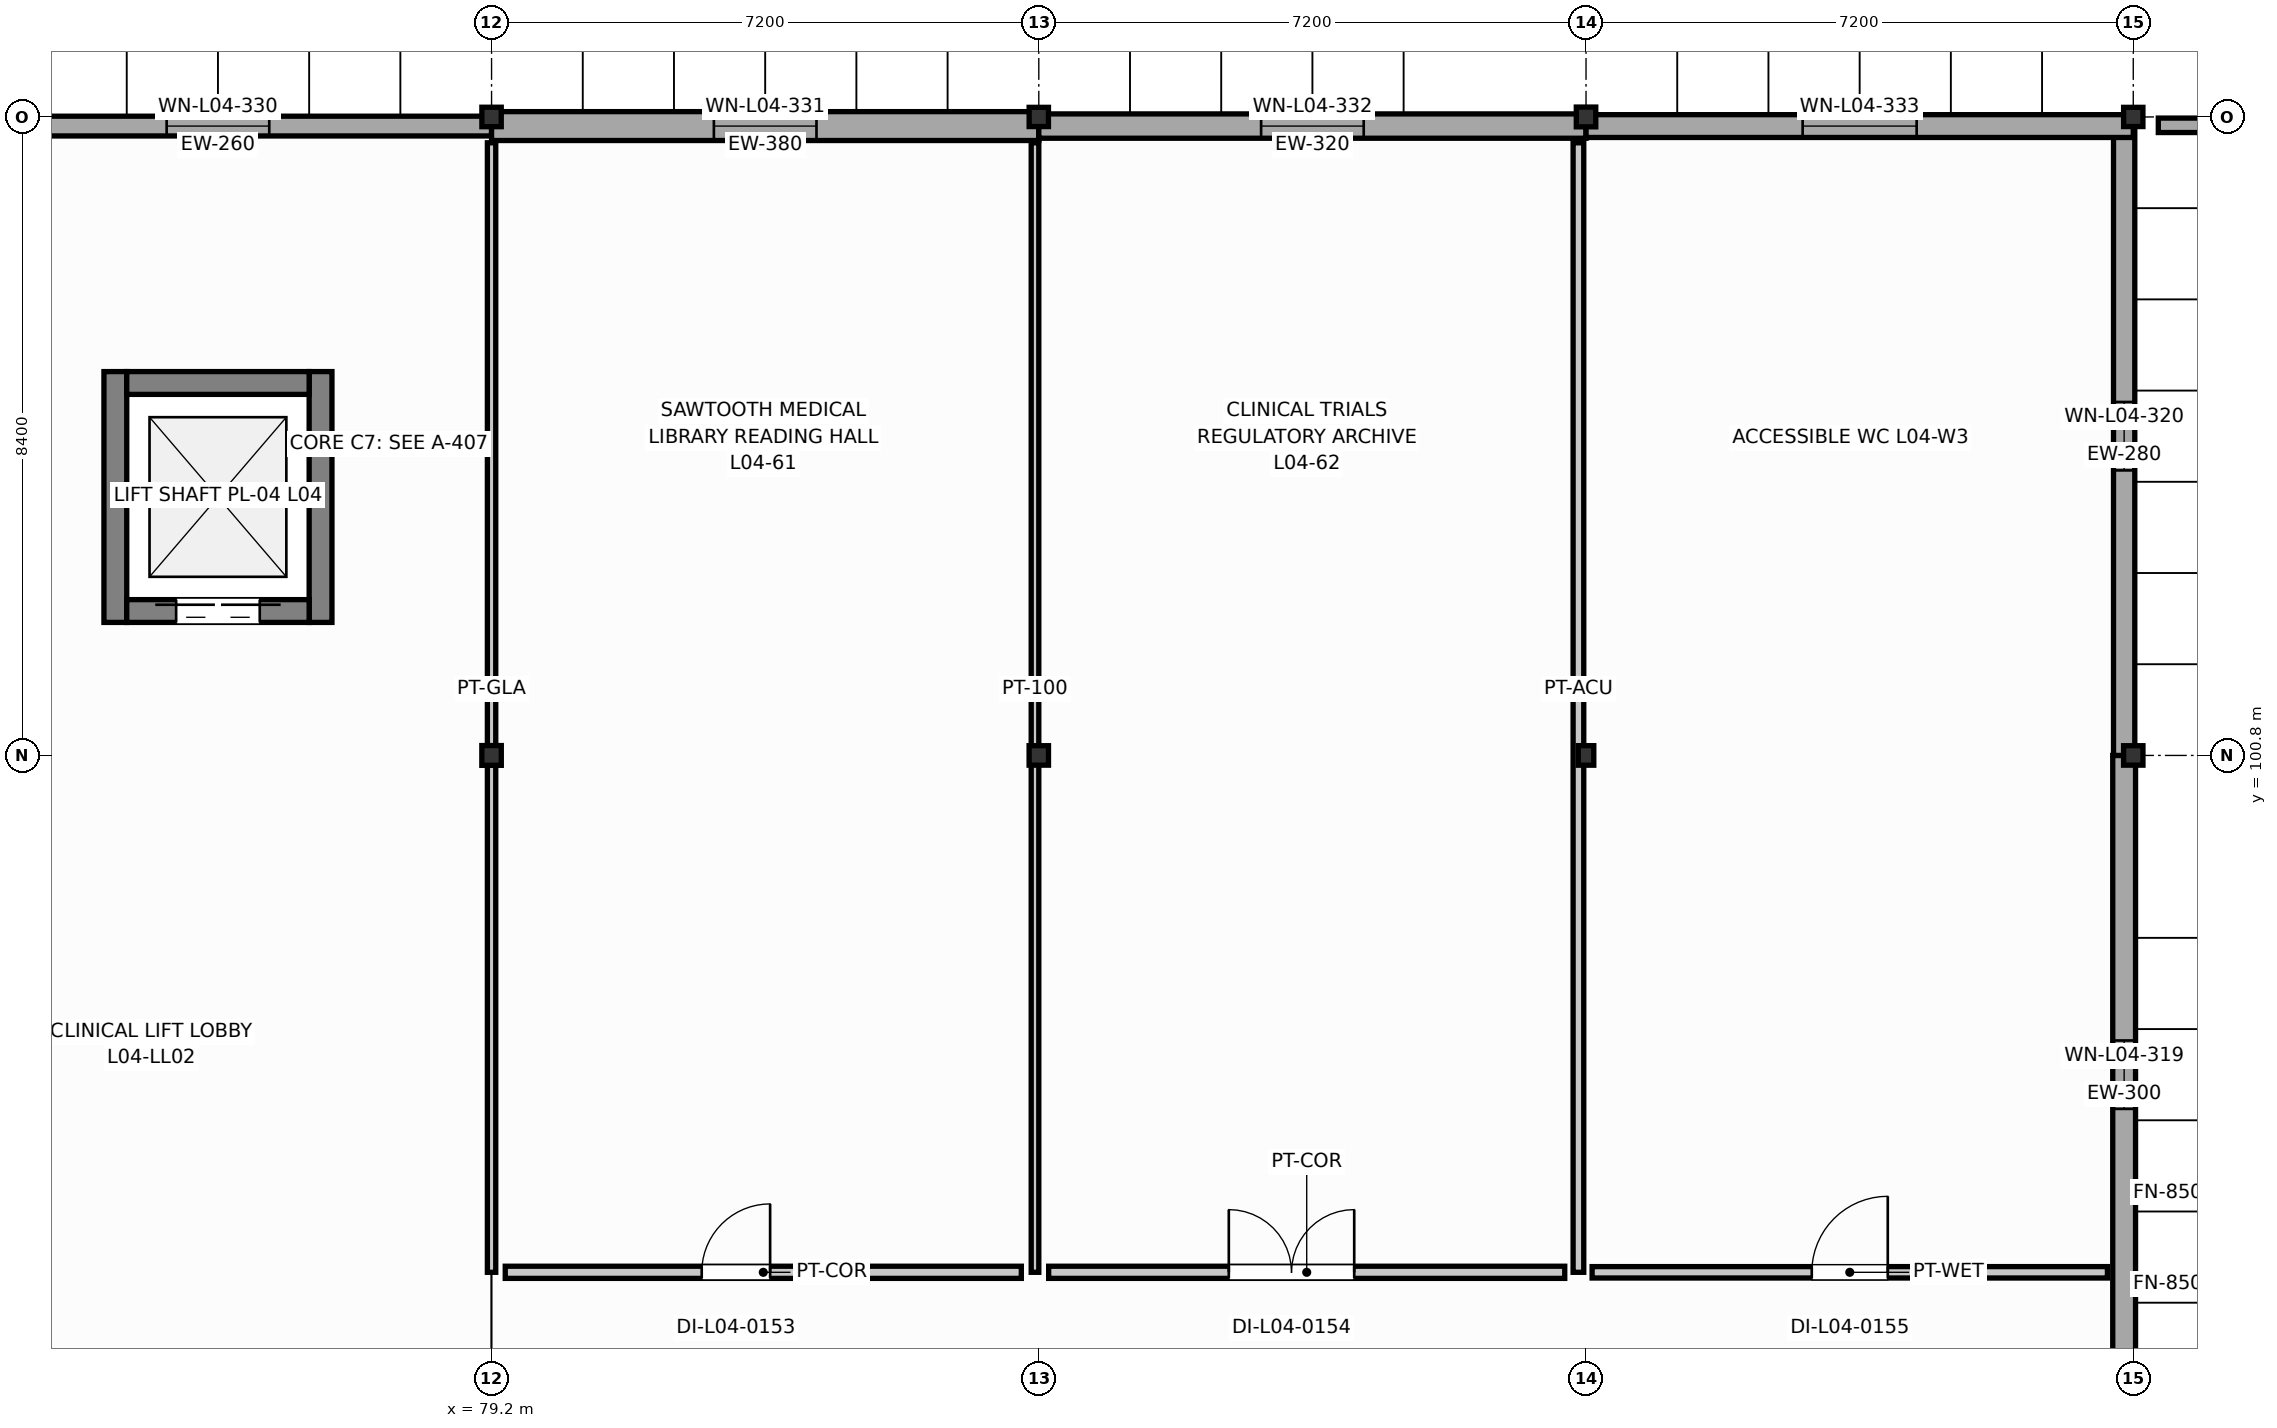
"""IFC4 building model, lengths in metres.
Left out: names, types, materials, properties, quantities, classifications, styles, units other than length and angle.
Written with IfcOpenShell. Run it as: python <this file> out.ifc"""

import sys

from ifc_helpers import new_model, si_unit, direction, frame, frame_2d, origin, origin_2d, place, context, subcontext, project, spatial, rectangle, i_section, extrude, element, fill, save


model = new_model("IFC4")
c1 = context("Model", 3, precision=1e-05, world=origin(), true_north=direction((0.0, 1.0)))
c2 = subcontext(c1, "Body", "Model", "MODEL_VIEW")
j1 = project(units=[si_unit("LENGTHUNIT", "METRE"), si_unit("PLANEANGLEUNIT", "RADIAN")], contexts=[c1])
p1 = place(None, origin())
s1 = spatial("IfcSite", under=j1, at=p1, CompositionType="ELEMENT")
p2 = place(p1, origin())
s2 = spatial("IfcBuilding", under=s1, at=p2, CompositionType="ELEMENT")
p3 = place(p2, frame((0.0, 0.0, 17.4)))
s3 = spatial("IfcBuildingStorey", under=s2, at=p3, CompositionType="ELEMENT", Elevation=17.4)
p4 = place(p3, frame((79.2, 100.8, 0.0), z_axis=(0.0, 0.0, 1.0), x_axis=(1.0, 0.0, 0.0)))
e1 = element("IfcColumn", 1, at=p4, inside=s3, PredefinedType="COLUMN", context=c2, shape_type="SweptSolid", body=[
    extrude(i_section(OverallWidth=0.256, OverallDepth=0.26, WebThickness=0.011, FlangeThickness=0.017, FilletRadius=0.013, at=origin_2d()), origin(), (0.0, 0.0, 1.0), 4.2),
])
for number, where, z_axis, x_axis in (
    (2, (79.2, 109.2, 0.0), (0.0, 0.0, 1.0), (1.0, 0.0, 0.0)),
    (3, (86.4, 100.8, 0.0), (0.0, 0.0, 1.0), (1.0, 0.0, 0.0)),
):
    element("IfcColumn", number, at=place(p3, frame(where, z_axis=z_axis, x_axis=x_axis)), inside=s3, PredefinedType="COLUMN", context=c2, shape_type="SweptSolid", body=[
        extrude(i_section(OverallWidth=0.255, OverallDepth=0.256, WebThickness=0.01, FlangeThickness=0.016, FilletRadius=0.013, at=origin_2d()), origin(), (0.0, 0.0, 1.0), 4.2),
    ])
p5 = place(p3, frame((86.4, 109.2, 0.0), z_axis=(0.0, 0.0, 1.0), x_axis=(1.0, 0.0, 0.0)))
e4 = element("IfcColumn", 4, at=p5, inside=s3, PredefinedType="COLUMN", context=c2, shape_type="SweptSolid", body=[
    extrude(i_section(OverallWidth=0.254, OverallDepth=0.253, WebThickness=0.009, FlangeThickness=0.014, FilletRadius=0.013, at=origin_2d()), origin(), (0.0, 0.0, 1.0), 4.2),
])
p6 = place(p3, frame((93.6, 100.8, 0.0), z_axis=(0.0, 0.0, 1.0), x_axis=(1.0, 0.0, 0.0)))
e5 = element("IfcColumn", 5, at=p6, inside=s3, PredefinedType="COLUMN", context=c2, shape_type="SweptSolid", body=[
    extrude(i_section(OverallWidth=0.204, OverallDepth=0.257, WebThickness=0.009, FlangeThickness=0.016, FilletRadius=0.013, at=origin_2d()), origin(), (0.0, 0.0, 1.0), 4.2),
])
p7 = place(p3, frame((93.6, 109.2, 0.0), z_axis=(0.0, 0.0, 1.0), x_axis=(1.0, 0.0, 0.0)))
e6 = element("IfcColumn", 6, at=p7, inside=s3, PredefinedType="COLUMN", context=c2, shape_type="SweptSolid", body=[
    extrude(i_section(OverallWidth=0.256, OverallDepth=0.26, WebThickness=0.011, FlangeThickness=0.017, FilletRadius=0.013, at=origin_2d()), origin(), (0.0, 0.0, 1.0), 4.2),
])
p8 = place(p3, frame((100.8, 100.8, 0.0), z_axis=(0.0, 0.0, 1.0), x_axis=(1.0, 0.0, 0.0)))
e7 = element("IfcColumn", 7, at=p8, inside=s3, PredefinedType="COLUMN", context=c2, shape_type="SweptSolid", body=[
    extrude(i_section(OverallWidth=0.255, OverallDepth=0.256, WebThickness=0.01, FlangeThickness=0.016, FilletRadius=0.013, at=origin_2d()), origin(), (0.0, 0.0, 1.0), 4.2),
])
p9 = place(p3, frame((100.8, 109.2, 0.0), z_axis=(0.0, 0.0, 1.0), x_axis=(1.0, 0.0, 0.0)))
e8 = element("IfcColumn", 8, at=p9, inside=s3, PredefinedType="COLUMN", context=c2, shape_type="SweptSolid", body=[
    extrude(i_section(OverallWidth=0.254, OverallDepth=0.253, WebThickness=0.009, FlangeThickness=0.014, FilletRadius=0.013, at=origin_2d()), origin(), (0.0, 0.0, 1.0), 4.2),
])
for number, where, z_axis, x_axis in (
    (9, (74.25, 102.55, 0.0), (0.0, 0.0, 1.0), (0.0, 1.0, 0.0)),
    (10, (76.95, 102.55, 0.0), (0.0, 0.0, 1.0), (0.0, 1.0, 0.0)),
):
    element("IfcWall", number, at=place(p3, frame(where, z_axis=z_axis, x_axis=x_axis)), inside=s3, PredefinedType="SHEAR", context=c2, shape_type="SweptSolid", body=[
        extrude(rectangle(XDim=3.3, YDim=0.3, at=frame_2d((1.65, 0.0))), origin(), (0.0, 0.0, 1.0), 4.0),
    ])
p10 = place(p3, frame((74.4, 105.7, 0.0), z_axis=(0.0, 0.0, 1.0), x_axis=(1.0, 0.0, 0.0)))
e11 = element("IfcWall", 11, at=p10, inside=s3, PredefinedType="SHEAR", context=c2, shape_type="SweptSolid", body=[
    extrude(rectangle(XDim=2.4, YDim=0.3, at=frame_2d((1.2, 0.0))), origin(), (0.0, 0.0, 1.0), 4.0),
])
p11 = place(p3, frame((74.4, 102.7, 0.0), z_axis=(0.0, 0.0, 1.0), x_axis=(1.0, 0.0, 0.0)))
e12 = element("IfcWall", 12, at=p11, inside=s3, PredefinedType="SHEAR", context=c2, shape_type="SweptSolid", body=[
    extrude(rectangle(XDim=2.4, YDim=0.3, at=frame_2d((1.2, 0.0))), origin(), (0.0, 0.0, 1.0), 4.0),
])
p12 = place(p11, frame((0.65, 0.0, 0.0)))
e13 = element("IfcOpeningElement", 13, at=p12, cuts=e12, PredefinedType="OPENING", context=c2, shape_type="SweptSolid", body=[
    extrude(rectangle(XDim=1.1, YDim=2.15, at=frame_2d((0.55, 1.075))), frame((0.0, 0.16, 0.0), z_axis=(0.0, -1.0, 0.0), x_axis=(1.0, 0.0, 0.0)), (0.0, 0.0, 1.0), 0.32),
])
p13 = place(p3, frame((100.68, 92.4, 0.0), z_axis=(0.0, 0.0, 1.0), x_axis=(0.0, 1.0, 0.0)))
e14 = element("IfcWall", 14, at=p13, inside=s3, PredefinedType="SOLIDWALL", context=c2, shape_type="SweptSolid", body=[
    extrude(rectangle(XDim=8.4, YDim=0.3, at=frame_2d((4.2, 0.0))), origin(), (0.0, 0.0, 1.0), 3.405),
])
p14 = place(p13, frame((3.75, 0.0, 0.95)))
e15 = element("IfcOpeningElement", 15, at=p14, cuts=e14, PredefinedType="OPENING", context=c2, shape_type="SweptSolid", body=[
    extrude(rectangle(XDim=0.9, YDim=1.55, at=frame_2d((0.45, 0.775))), frame((0.0, 0.16, 0.0), z_axis=(0.0, -1.0, 0.0), x_axis=(1.0, 0.0, 0.0)), (0.0, 0.0, 1.0), 0.32),
])
p15 = place(p3, frame((100.68, 100.8, 0.0), z_axis=(0.0, 0.0, 1.0), x_axis=(0.0, 1.0, 0.0)))
e16 = element("IfcWall", 16, at=p15, inside=s3, PredefinedType="SOLIDWALL", context=c2, shape_type="SweptSolid", body=[
    extrude(rectangle(XDim=8.4, YDim=0.28, at=frame_2d((4.2, 0.0))), origin(), (0.0, 0.0, 1.0), 3.405),
])
p16 = place(p15, frame((3.75, 0.0, 0.95)))
e17 = element("IfcOpeningElement", 17, at=p16, cuts=e16, PredefinedType="OPENING", context=c2, shape_type="SweptSolid", body=[
    extrude(rectangle(XDim=0.9, YDim=1.75, at=frame_2d((0.45, 0.875))), frame((0.0, 0.15, 0.0), z_axis=(0.0, -1.0, 0.0), x_axis=(1.0, 0.0, 0.0)), (0.0, 0.0, 1.0), 0.3),
])
p17 = place(p3, frame((72.0, 109.08, 0.0), z_axis=(0.0, 0.0, 1.0), x_axis=(1.0, 0.0, 0.0)))
e18 = element("IfcWall", 18, at=p17, inside=s3, PredefinedType="SOLIDWALL", context=c2, shape_type="SweptSolid", body=[
    extrude(rectangle(XDim=7.2, YDim=0.26, at=frame_2d((3.6, 0.0))), origin(), (0.0, 0.0, 1.0), 3.482),
])
p18 = place(p17, frame((2.925, 0.0, 0.95)))
e19 = element("IfcOpeningElement", 19, at=p18, cuts=e18, PredefinedType="OPENING", context=c2, shape_type="SweptSolid", body=[
    extrude(rectangle(XDim=1.35, YDim=1.35, at=frame_2d((0.675, 0.675))), frame((0.0, 0.14, 0.0), z_axis=(0.0, -1.0, 0.0), x_axis=(1.0, 0.0, 0.0)), (0.0, 0.0, 1.0), 0.28),
])
p19 = place(p3, frame((79.2, 109.08, 0.0), z_axis=(0.0, 0.0, 1.0), x_axis=(1.0, 0.0, 0.0)))
e20 = element("IfcWall", 20, at=p19, inside=s3, PredefinedType="SOLIDWALL", context=c2, shape_type="SweptSolid", body=[
    extrude(rectangle(XDim=7.2, YDim=0.38, at=frame_2d((3.6, 0.0))), origin(), (0.0, 0.0, 1.0), 3.482),
])
p20 = place(p19, frame((2.925, 0.0, 0.95)))
e21 = element("IfcOpeningElement", 21, at=p20, cuts=e20, PredefinedType="OPENING", context=c2, shape_type="SweptSolid", body=[
    extrude(rectangle(XDim=1.35, YDim=1.55, at=frame_2d((0.675, 0.775))), frame((0.0, 0.2, 0.0), z_axis=(0.0, -1.0, 0.0), x_axis=(1.0, 0.0, 0.0)), (0.0, 0.0, 1.0), 0.4),
])
p21 = place(p3, frame((86.4, 109.08, 0.0), z_axis=(0.0, 0.0, 1.0), x_axis=(1.0, 0.0, 0.0)))
e22 = element("IfcWall", 22, at=p21, inside=s3, PredefinedType="SOLIDWALL", context=c2, shape_type="SweptSolid", body=[
    extrude(rectangle(XDim=7.2, YDim=0.32, at=frame_2d((3.6, 0.0))), origin(), (0.0, 0.0, 1.0), 3.482),
])
p22 = place(p21, frame((2.925, 0.0, 0.95)))
e23 = element("IfcOpeningElement", 23, at=p22, cuts=e22, PredefinedType="OPENING", context=c2, shape_type="SweptSolid", body=[
    extrude(rectangle(XDim=1.35, YDim=1.75, at=frame_2d((0.675, 0.875))), frame((0.0, 0.17, 0.0), z_axis=(0.0, -1.0, 0.0), x_axis=(1.0, 0.0, 0.0)), (0.0, 0.0, 1.0), 0.34),
])
p23 = place(p3, frame((93.6, 109.08, 0.0), z_axis=(0.0, 0.0, 1.0), x_axis=(1.0, 0.0, 0.0)))
e24 = element("IfcWall", 24, at=p23, inside=s3, PredefinedType="SOLIDWALL", context=c2, shape_type="SweptSolid", body=[
    extrude(rectangle(XDim=7.2, YDim=0.3, at=frame_2d((3.6, 0.0))), origin(), (0.0, 0.0, 1.0), 3.482),
])
p24 = place(p23, frame((2.85, 0.0, 0.95)))
e25 = element("IfcOpeningElement", 25, at=p24, cuts=e24, PredefinedType="OPENING", context=c2, shape_type="SweptSolid", body=[
    extrude(rectangle(XDim=1.5, YDim=1.15, at=frame_2d((0.75, 0.575))), frame((0.0, 0.16, 0.0), z_axis=(0.0, -1.0, 0.0), x_axis=(1.0, 0.0, 0.0)), (0.0, 0.0, 1.0), 0.32),
])
p25 = place(p3, frame((101.129, 109.09, 0.0), z_axis=(0.0, 0.0, 1.0), x_axis=(1.0, 0.0, 0.0)))
e26 = element("IfcWall", 26, at=p25, inside=s3, PredefinedType="PARAPET", context=c2, shape_type="SweptSolid", body=[
    extrude(rectangle(XDim=6.594, YDim=0.19, at=frame_2d((3.297, 0.0))), origin(), (0.0, 0.0, 1.0), 1.15),
])
p26 = place(p3, frame((79.2, 94.0, 0.0), z_axis=(0.0, 0.0, 1.0), x_axis=(0.0, 1.0, 0.0)))
e27 = element("IfcWall", 27, at=p26, inside=s3, PredefinedType="MOVABLE", context=c2, shape_type="SweptSolid", body=[
    extrude(rectangle(XDim=14.86, YDim=0.11, at=frame_2d((7.43, 0.0))), origin(), (0.0, 0.0, 1.0), 3.408),
])
p27 = place(p3, frame((86.35, 108.86, 0.0), z_axis=(0.0, 0.0, 1.0), x_axis=(0.0, -1.0, 0.0)))
e28 = element("IfcWall", 28, at=p27, inside=s3, PredefinedType="PARTITIONING", context=c2, shape_type="SweptSolid", body=[
    extrude(rectangle(XDim=14.86, YDim=0.1, at=frame_2d((7.43, 0.0))), origin(), (0.0, 0.0, 1.0), 3.485),
])
p28 = place(p3, frame((86.17, 94.0, 0.0), z_axis=(0.0, 0.0, 1.0), x_axis=(-1.0, 0.0, 0.0)))
e29 = element("IfcWall", 29, at=p28, inside=s3, PredefinedType="PARTITIONING", context=c2, shape_type="SweptSolid", body=[
    extrude(rectangle(XDim=6.79, YDim=0.16, at=frame_2d((3.395, 0.0))), origin(), (0.0, 0.0, 1.0), 3.408),
])
p29 = place(p28, frame((3.305, 0.0, 0.0)))
e30 = element("IfcOpeningElement", 30, at=p29, cuts=e29, PredefinedType="OPENING", context=c2, shape_type="SweptSolid", body=[
    extrude(rectangle(XDim=0.9, YDim=2.04, at=frame_2d((0.45, 1.02))), frame((0.0, 0.09, 0.0), z_axis=(0.0, -1.0, 0.0), x_axis=(1.0, 0.0, 0.0)), (0.0, 0.0, 1.0), 0.18),
])
p30 = place(p3, frame((93.5, 108.86, 0.0), z_axis=(0.0, 0.0, 1.0), x_axis=(0.0, -1.0, 0.0)))
e31 = element("IfcWall", 31, at=p30, inside=s3, PredefinedType="PARTITIONING", context=c2, shape_type="SweptSolid", body=[
    extrude(rectangle(XDim=14.86, YDim=0.14, at=frame_2d((7.43, 0.0))), origin(), (0.0, 0.0, 1.0), 3.175),
])
p31 = place(p3, frame((93.32, 94.0, 0.0), z_axis=(0.0, 0.0, 1.0), x_axis=(-1.0, 0.0, 0.0)))
e32 = element("IfcWall", 32, at=p31, inside=s3, PredefinedType="PARTITIONING", context=c2, shape_type="SweptSolid", body=[
    extrude(rectangle(XDim=6.79, YDim=0.16, at=frame_2d((3.395, 0.0))), origin(), (0.0, 0.0, 1.0), 3.175),
])
p32 = place(p31, frame((2.77, 0.0, 0.0)))
e33 = element("IfcOpeningElement", 33, at=p32, cuts=e32, PredefinedType="OPENING", context=c2, shape_type="SweptSolid", body=[
    extrude(rectangle(XDim=1.65, YDim=2.2, at=frame_2d((0.825, 1.1))), frame((0.0, 0.09, 0.0), z_axis=(0.0, -1.0, 0.0), x_axis=(1.0, 0.0, 0.0)), (0.0, 0.0, 1.0), 0.18),
])
p33 = place(p3, frame((100.46, 94.0, 0.0), z_axis=(0.0, 0.0, 1.0), x_axis=(-1.0, 0.0, 0.0)))
e34 = element("IfcWall", 34, at=p33, inside=s3, PredefinedType="PLUMBINGWALL", context=c2, shape_type="SweptSolid", body=[
    extrude(rectangle(XDim=6.78, YDim=0.15, at=frame_2d((3.39, 0.0))), origin(), (0.0, 0.0, 1.0), 3.175),
])
p34 = place(p33, frame((2.89, 0.0, 0.0)))
e35 = element("IfcOpeningElement", 35, at=p34, cuts=e34, PredefinedType="OPENING", context=c2, shape_type="SweptSolid", body=[
    extrude(rectangle(XDim=1.0, YDim=2.1, at=frame_2d((0.5, 1.05))), frame((0.0, 0.085, 0.0), z_axis=(0.0, -1.0, 0.0), x_axis=(1.0, 0.0, 0.0)), (0.0, 0.0, 1.0), 0.17),
])
p35 = place(p12, origin())
e36 = element("IfcDoor", 36, at=p35, inside=s3, OperationType="DOUBLE_DOOR_SLIDING", PredefinedType="DOOR", context=c2, shape_type="SweptSolid", body=[
    extrude(rectangle(XDim=1.1, YDim=2.15, at=frame_2d((0.55, 1.075))), frame((0.0, 0.025, 0.0), z_axis=(0.0, -1.0, 0.0), x_axis=(1.0, 0.0, 0.0)), (0.0, 0.0, 1.0), 0.05),
])
fill(e13, e36)
p36 = place(p14, origin())
e37 = element("IfcWindow", 37, at=p36, inside=s3, PartitioningType="SINGLE_PANEL", PredefinedType="WINDOW", context=c2, shape_type="SweptSolid", body=[
    extrude(rectangle(XDim=0.9, YDim=1.55, at=frame_2d((0.45, 0.775))), frame((0.0, 0.03, 0.0), z_axis=(0.0, -1.0, 0.0), x_axis=(1.0, 0.0, 0.0)), (0.0, 0.0, 1.0), 0.06),
])
fill(e15, e37)
p37 = place(p16, origin())
e38 = element("IfcWindow", 38, at=p37, inside=s3, PartitioningType="SINGLE_PANEL", PredefinedType="WINDOW", context=c2, shape_type="SweptSolid", body=[
    extrude(rectangle(XDim=0.9, YDim=1.75, at=frame_2d((0.45, 0.875))), frame((0.0, 0.03, 0.0), z_axis=(0.0, -1.0, 0.0), x_axis=(1.0, 0.0, 0.0)), (0.0, 0.0, 1.0), 0.06),
])
fill(e17, e38)
p38 = place(p18, origin())
e39 = element("IfcWindow", 39, at=p38, inside=s3, PartitioningType="SINGLE_PANEL", PredefinedType="WINDOW", context=c2, shape_type="SweptSolid", body=[
    extrude(rectangle(XDim=1.35, YDim=1.35, at=frame_2d((0.675, 0.675))), frame((0.0, 0.03, 0.0), z_axis=(0.0, -1.0, 0.0), x_axis=(1.0, 0.0, 0.0)), (0.0, 0.0, 1.0), 0.06),
])
fill(e19, e39)
p39 = place(p20, origin())
e40 = element("IfcWindow", 40, at=p39, inside=s3, PartitioningType="SINGLE_PANEL", PredefinedType="WINDOW", context=c2, shape_type="SweptSolid", body=[
    extrude(rectangle(XDim=1.35, YDim=1.55, at=frame_2d((0.675, 0.775))), frame((0.0, 0.03, 0.0), z_axis=(0.0, -1.0, 0.0), x_axis=(1.0, 0.0, 0.0)), (0.0, 0.0, 1.0), 0.06),
])
fill(e21, e40)
p40 = place(p22, origin())
e41 = element("IfcWindow", 41, at=p40, inside=s3, PartitioningType="SINGLE_PANEL", PredefinedType="WINDOW", context=c2, shape_type="SweptSolid", body=[
    extrude(rectangle(XDim=1.35, YDim=1.75, at=frame_2d((0.675, 0.875))), frame((0.0, 0.03, 0.0), z_axis=(0.0, -1.0, 0.0), x_axis=(1.0, 0.0, 0.0)), (0.0, 0.0, 1.0), 0.06),
])
fill(e23, e41)
p41 = place(p24, origin())
e42 = element("IfcWindow", 42, at=p41, inside=s3, PartitioningType="SINGLE_PANEL", PredefinedType="WINDOW", context=c2, shape_type="SweptSolid", body=[
    extrude(rectangle(XDim=1.5, YDim=1.15, at=frame_2d((0.75, 0.575))), frame((0.0, 0.03, 0.0), z_axis=(0.0, -1.0, 0.0), x_axis=(1.0, 0.0, 0.0)), (0.0, 0.0, 1.0), 0.06),
])
fill(e25, e42)
p42 = place(p29, frame((0.9, 0.0, 0.0), z_axis=(0.0, 0.0, 1.0), x_axis=(-1.0, 0.0, 0.0)))
e43 = element("IfcDoor", 43, at=p42, inside=s3, OperationType="SINGLE_SWING_RIGHT", PredefinedType="DOOR", context=c2, shape_type="SweptSolid", body=[
    extrude(rectangle(XDim=0.9, YDim=2.04, at=frame_2d((0.45, 1.02))), frame((0.0, 0.025, 0.0), z_axis=(0.0, -1.0, 0.0), x_axis=(1.0, 0.0, 0.0)), (0.0, 0.0, 1.0), 0.05),
])
fill(e30, e43)
p43 = place(p32, frame((1.65, 0.0, 0.0), z_axis=(0.0, 0.0, 1.0), x_axis=(-1.0, 0.0, 0.0)))
e44 = element("IfcDoor", 44, at=p43, inside=s3, OperationType="DOUBLE_DOOR_SINGLE_SWING", PredefinedType="DOOR", context=c2, shape_type="SweptSolid", body=[
    extrude(rectangle(XDim=1.65, YDim=2.2, at=frame_2d((0.825, 1.1))), frame((0.0, 0.025, 0.0), z_axis=(0.0, -1.0, 0.0), x_axis=(1.0, 0.0, 0.0)), (0.0, 0.0, 1.0), 0.05),
])
fill(e33, e44)
p44 = place(p34, frame((1.0, 0.0, 0.0), z_axis=(0.0, 0.0, 1.0), x_axis=(-1.0, 0.0, 0.0)))
e45 = element("IfcDoor", 45, at=p44, inside=s3, OperationType="SINGLE_SWING_RIGHT", PredefinedType="DOOR", context=c2, shape_type="SweptSolid", body=[
    extrude(rectangle(XDim=1.0, YDim=2.1, at=frame_2d((0.5, 1.05))), frame((0.0, 0.025, 0.0), z_axis=(0.0, -1.0, 0.0), x_axis=(1.0, 0.0, 0.0)), (0.0, 0.0, 1.0), 0.05),
])
fill(e35, e45)
save(model, sys.argv[1])
